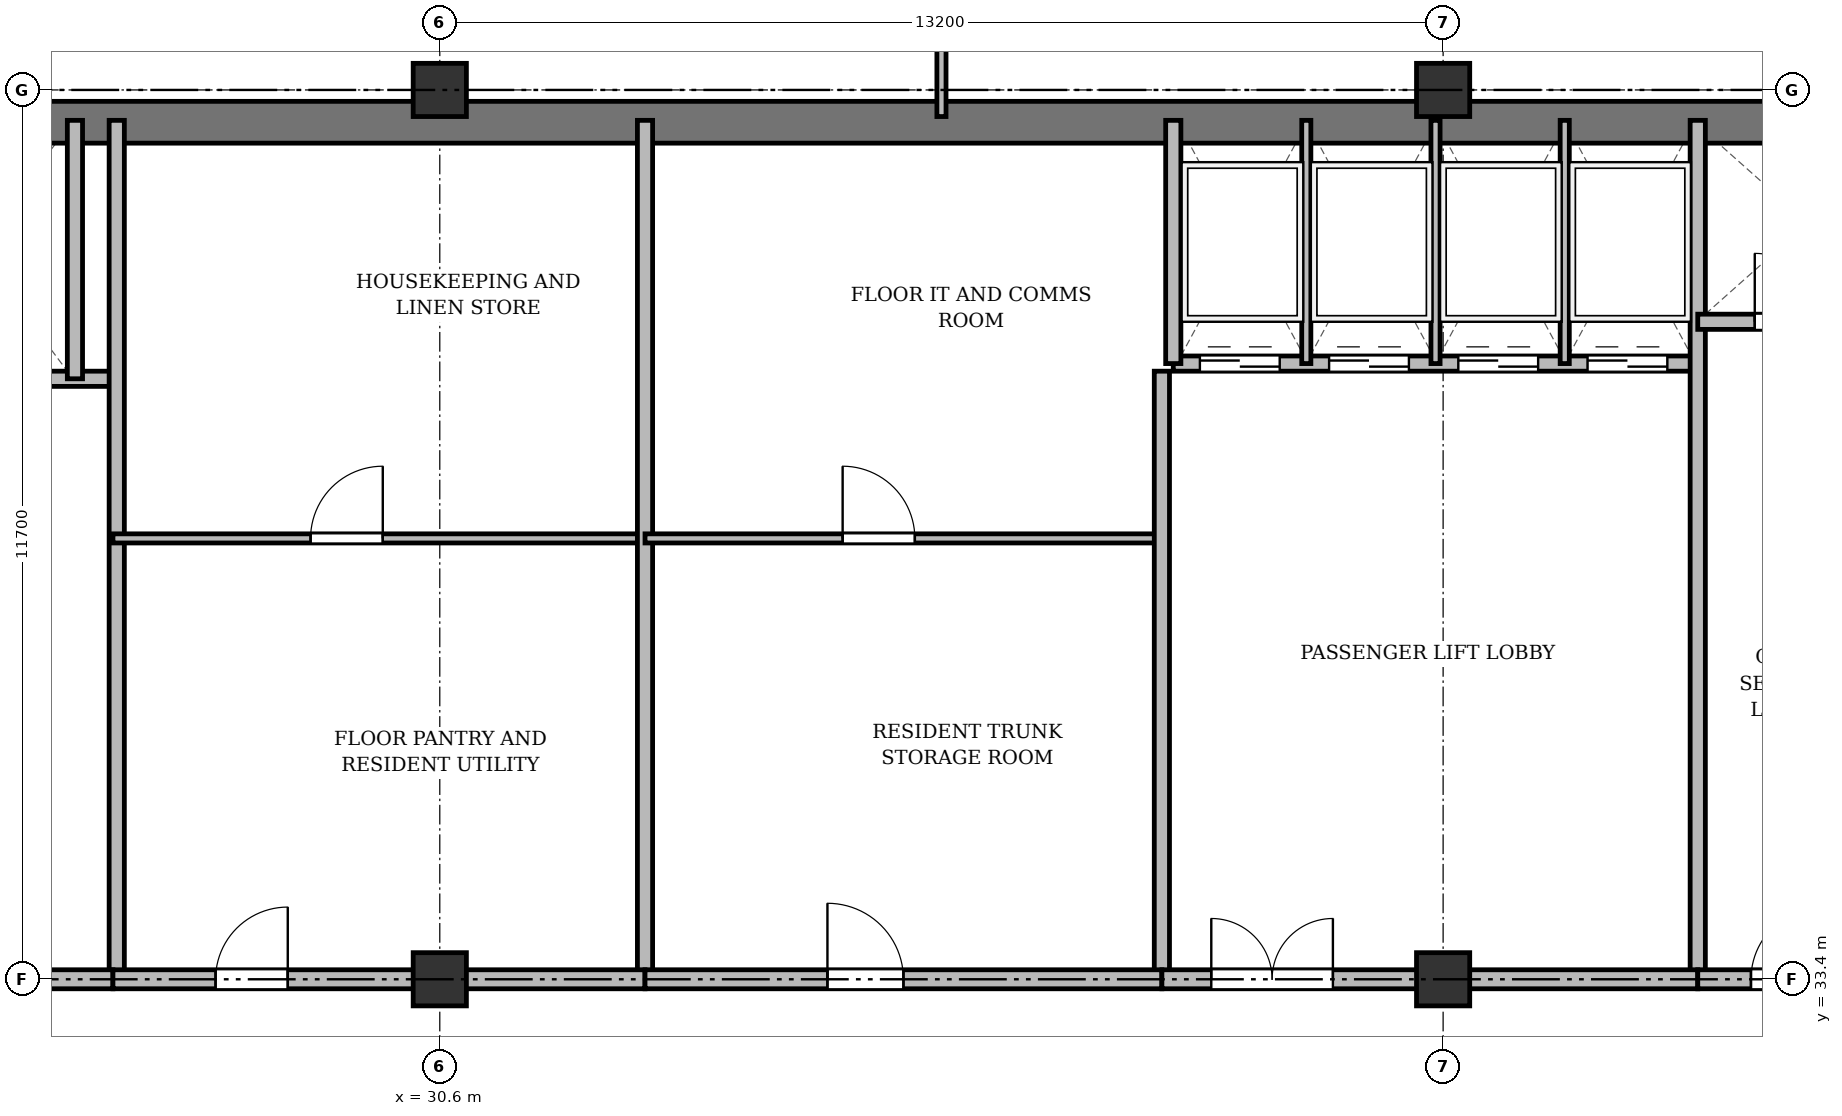
"""IFC4 building model, lengths in metres.
Left out: names, types, materials, properties, quantities, classifications, styles, units other than length and angle.
Written with IfcOpenShell. Run it as: python <this file> out.ifc"""

import sys

from ifc_helpers import new_model, si_unit, direction, frame, frame_2d, origin, origin_2d, place, context, subcontext, project, spatial, rectangle, extrude, source, transform, mapped, element, fill, save


model = new_model("IFC4")
c1 = context("Model", 3, precision=1e-05, world=origin(), true_north=direction((0.0, 1.0)))
c2 = subcontext(c1, "Body", "Model", "MODEL_VIEW")
j1 = project(units=[si_unit("LENGTHUNIT", "METRE"), si_unit("PLANEANGLEUNIT", "RADIAN")], contexts=[c1])
p1 = place(None, origin())
s1 = spatial("IfcSite", under=j1, at=p1, CompositionType="ELEMENT")
p2 = place(p1, origin())
s2 = spatial("IfcBuilding", under=s1, at=p2, CompositionType="ELEMENT")
p3 = place(p2, frame((0.0, 0.0, 226.5)))
s3 = spatial("IfcBuildingStorey", under=s2, at=p3, CompositionType="ELEMENT", Elevation=226.5)
m1 = source(origin(), c2, "Body", "SweptSolid", [
    extrude(rectangle(XDim=0.7, YDim=0.7, at=origin_2d()), origin(), (0.0, 0.0, 1.0), 3.6),
])
for number, where, z_axis, x_axis in (
    (1, (30.6, 33.4, 0.0), (0.0, 0.0, 1.0), (1.0, 0.0, 0.0)),
    (2, (30.6, 45.1, 0.0), (0.0, 0.0, 1.0), (1.0, 0.0, 0.0)),
    (3, (43.8, 33.4, 0.0), (0.0, 0.0, 1.0), (1.0, 0.0, 0.0)),
    (4, (43.8, 45.1, 0.0), (0.0, 0.0, 1.0), (1.0, 0.0, 0.0)),
):
    element("IfcColumn", number, at=place(p3, frame(where, z_axis=z_axis, x_axis=x_axis)), inside=s3, PredefinedType="COLUMN", context=c2, shape_type="MappedRepresentation", body=[
        mapped(m1, transform((0.0, 0.0, 0.0), x_axis=(1.0, 0.0, 0.0), y_axis=(0.0, 1.0, 0.0), z_axis=(0.0, 0.0, 1.0), scale=1.0)),
    ])
p4 = place(p3, frame((15.65, 44.675, 0.0), z_axis=(0.0, 0.0, 1.0), x_axis=(1.0, 0.0, 0.0)))
e5 = element("IfcWall", 5, at=p4, inside=s3, PredefinedType="SHEAR", context=c2, shape_type="SweptSolid", body=[
    extrude(rectangle(XDim=43.1, YDim=0.55, at=frame_2d((21.55, 0.0))), origin(), (0.0, 0.0, 1.0), 3.36),
])
p5 = place(p3, frame((19.55, 41.3, 0.0), z_axis=(0.0, 0.0, 1.0), x_axis=(1.0, 0.0, 0.0)))
e6 = element("IfcWall", 6, at=p5, inside=s3, PredefinedType="SOLIDWALL", context=c2, shape_type="SweptSolid", body=[
    extrude(rectangle(XDim=6.75, YDim=0.2, at=frame_2d((3.375, 0.0))), origin(), (0.0, 0.0, 1.0), 3.36),
])
p6 = place(p5, frame((1.7, 0.0, 0.0)))
e7 = element("IfcOpeningElement", 7, at=p6, cuts=e6, PredefinedType="OPENING", context=c2, shape_type="SweptSolid", body=[
    extrude(rectangle(XDim=1.1, YDim=2.15, at=frame_2d((0.55, 1.075))), frame((0.0, 0.11, 0.0), z_axis=(0.0, -1.0, 0.0), x_axis=(1.0, 0.0, 0.0)), (0.0, 0.0, 1.0), 0.22),
])
p7 = place(p5, frame((4.4, 0.0, 0.0)))
e8 = element("IfcOpeningElement", 8, at=p7, cuts=e6, PredefinedType="OPENING", context=c2, shape_type="SweptSolid", body=[
    extrude(rectangle(XDim=1.1, YDim=2.15, at=frame_2d((0.55, 1.075))), frame((0.0, 0.11, 0.0), z_axis=(0.0, -1.0, 0.0), x_axis=(1.0, 0.0, 0.0)), (0.0, 0.0, 1.0), 0.22),
])
p8 = place(p3, frame((25.8, 41.3, 0.0), z_axis=(0.0, 0.0, 1.0), x_axis=(0.0, 1.0, 0.0)))
e9 = element("IfcWall", 9, at=p8, inside=s3, PredefinedType="SOLIDWALL", context=c2, shape_type="SweptSolid", body=[
    extrude(rectangle(XDim=3.4, YDim=0.2, at=frame_2d((1.7, 0.0))), origin(), (0.0, 0.0, 1.0), 3.36),
])
p9 = place(p3, frame((26.35, 33.4, 0.0), z_axis=(0.0, 0.0, 1.0), x_axis=(0.0, 1.0, 0.0)))
e10 = element("IfcWall", 10, at=p9, inside=s3, PredefinedType="SOLIDWALL", context=c2, shape_type="SweptSolid", body=[
    extrude(rectangle(XDim=11.3, YDim=0.2, at=frame_2d((5.65, 0.0))), origin(), (0.0, 0.0, 1.0), 2.91),
])
p10 = place(p3, frame((19.5, 33.4, 0.0), z_axis=(0.0, 0.0, 1.0), x_axis=(1.0, 0.0, 0.0)))
e11 = element("IfcWall", 11, at=p10, inside=s3, PredefinedType="PARTITIONING", context=c2, shape_type="SweptSolid", body=[
    extrude(rectangle(XDim=6.8, YDim=0.25, at=frame_2d((3.4, 0.0))), origin(), (0.0, 0.0, 1.0), 2.91),
])
p11 = place(p10, frame((0.75, 0.0, 0.0)))
e12 = element("IfcOpeningElement", 12, at=p11, cuts=e11, PredefinedType="OPENING", context=c2, shape_type="SweptSolid", body=[
    extrude(rectangle(XDim=1.6, YDim=2.2, at=frame_2d((0.8, 1.1))), frame((0.0, 0.135, 0.0), z_axis=(0.0, -1.0, 0.0), x_axis=(1.0, 0.0, 0.0)), (0.0, 0.0, 1.0), 0.27),
])
p12 = place(p3, frame((26.3, 39.2, 0.0), z_axis=(0.0, 0.0, 1.0), x_axis=(1.0, 0.0, 0.0)))
e13 = element("IfcWall", 13, at=p12, inside=s3, PredefinedType="PARTITIONING", context=c2, shape_type="SweptSolid", body=[
    extrude(rectangle(XDim=7.0, YDim=0.12, at=frame_2d((3.5, 0.0))), origin(), (0.0, 0.0, 1.0), 2.86),
])
p13 = place(p12, frame((2.6, 0.0, 0.0)))
e14 = element("IfcOpeningElement", 14, at=p13, cuts=e13, PredefinedType="OPENING", context=c2, shape_type="SweptSolid", body=[
    extrude(rectangle(XDim=0.95, YDim=2.15, at=frame_2d((0.475, 1.075))), frame((0.0, 0.07, 0.0), z_axis=(0.0, -1.0, 0.0), x_axis=(1.0, 0.0, 0.0)), (0.0, 0.0, 1.0), 0.14),
])
p14 = place(p3, frame((33.3, 33.4, 0.0), z_axis=(0.0, 0.0, 1.0), x_axis=(0.0, 1.0, 0.0)))
e15 = element("IfcWall", 15, at=p14, inside=s3, PredefinedType="SOLIDWALL", context=c2, shape_type="SweptSolid", body=[
    extrude(rectangle(XDim=11.3, YDim=0.2, at=frame_2d((5.65, 0.0))), origin(), (0.0, 0.0, 1.0), 2.91),
])
p15 = place(p3, frame((33.3, 39.2, 0.0), z_axis=(0.0, 0.0, 1.0), x_axis=(1.0, 0.0, 0.0)))
e16 = element("IfcWall", 16, at=p15, inside=s3, PredefinedType="PARTITIONING", context=c2, shape_type="SweptSolid", body=[
    extrude(rectangle(XDim=6.8, YDim=0.12, at=frame_2d((3.4, 0.0))), origin(), (0.0, 0.0, 1.0), 3.36),
])
p16 = place(p15, frame((2.6, 0.0, 0.0)))
e17 = element("IfcOpeningElement", 17, at=p16, cuts=e16, PredefinedType="OPENING", context=c2, shape_type="SweptSolid", body=[
    extrude(rectangle(XDim=0.95, YDim=2.15, at=frame_2d((0.475, 1.075))), frame((0.0, 0.07, 0.0), z_axis=(0.0, -1.0, 0.0), x_axis=(1.0, 0.0, 0.0)), (0.0, 0.0, 1.0), 0.14),
])
p17 = place(p3, frame((40.1, 33.4, 0.0), z_axis=(0.0, 0.0, 1.0), x_axis=(0.0, 1.0, 0.0)))
e18 = element("IfcWall", 18, at=p17, inside=s3, PredefinedType="SOLIDWALL", context=c2, shape_type="SweptSolid", body=[
    extrude(rectangle(XDim=8.0, YDim=0.2, at=frame_2d((4.0, 0.0))), origin(), (0.0, 0.0, 1.0), 2.91),
])
p18 = place(p3, frame((40.25, 41.5, 0.0), z_axis=(0.0, 0.0, 1.0), x_axis=(1.0, 0.0, 0.0)))
e19 = element("IfcWall", 19, at=p18, inside=s3, PredefinedType="SOLIDWALL", context=c2, shape_type="SweptSolid", body=[
    extrude(rectangle(XDim=6.9, YDim=0.2, at=frame_2d((3.45, 0.0))), origin(), (0.0, 0.0, 1.0), 3.36),
])
p19 = place(p18, frame((0.35, 0.0, 0.0)))
e20 = element("IfcOpeningElement", 20, at=p19, cuts=e19, PredefinedType="OPENING", context=c2, shape_type="SweptSolid", body=[
    extrude(rectangle(XDim=1.05, YDim=2.15, at=frame_2d((0.525, 1.075))), frame((0.0, 0.11, 0.0), z_axis=(0.0, -1.0, 0.0), x_axis=(1.0, 0.0, 0.0)), (0.0, 0.0, 1.0), 0.22),
])
p20 = place(p18, frame((2.05, 0.0, 0.0)))
e21 = element("IfcOpeningElement", 21, at=p20, cuts=e19, PredefinedType="OPENING", context=c2, shape_type="SweptSolid", body=[
    extrude(rectangle(XDim=1.05, YDim=2.15, at=frame_2d((0.525, 1.075))), frame((0.0, 0.11, 0.0), z_axis=(0.0, -1.0, 0.0), x_axis=(1.0, 0.0, 0.0)), (0.0, 0.0, 1.0), 0.22),
])
p21 = place(p18, frame((3.75, 0.0, 0.0)))
e22 = element("IfcOpeningElement", 22, at=p21, cuts=e19, PredefinedType="OPENING", context=c2, shape_type="SweptSolid", body=[
    extrude(rectangle(XDim=1.05, YDim=2.15, at=frame_2d((0.525, 1.075))), frame((0.0, 0.11, 0.0), z_axis=(0.0, -1.0, 0.0), x_axis=(1.0, 0.0, 0.0)), (0.0, 0.0, 1.0), 0.22),
])
p22 = place(p18, frame((5.45, 0.0, 0.0)))
e23 = element("IfcOpeningElement", 23, at=p22, cuts=e19, PredefinedType="OPENING", context=c2, shape_type="SweptSolid", body=[
    extrude(rectangle(XDim=1.05, YDim=2.15, at=frame_2d((0.525, 1.075))), frame((0.0, 0.11, 0.0), z_axis=(0.0, -1.0, 0.0), x_axis=(1.0, 0.0, 0.0)), (0.0, 0.0, 1.0), 0.22),
])
p23 = place(p3, frame((40.25, 41.5, 0.0), z_axis=(0.0, 0.0, 1.0), x_axis=(0.0, 1.0, 0.0)))
e24 = element("IfcWall", 24, at=p23, inside=s3, PredefinedType="SOLIDWALL", context=c2, shape_type="SweptSolid", body=[
    extrude(rectangle(XDim=3.2, YDim=0.2, at=frame_2d((1.6, 0.0))), origin(), (0.0, 0.0, 1.0), 3.36),
])
for number, where, z_axis, x_axis in (
    (25, (42.0, 41.5, 0.0), (0.0, 0.0, 1.0), (0.0, 1.0, 0.0)),
    (26, (43.7, 41.5, 0.0), (0.0, 0.0, 1.0), (0.0, 1.0, 0.0)),
    (27, (45.4, 41.5, 0.0), (0.0, 0.0, 1.0), (0.0, 1.0, 0.0)),
):
    element("IfcWall", number, at=place(p3, frame(where, z_axis=z_axis, x_axis=x_axis)), inside=s3, PredefinedType="PARTITIONING", context=c2, shape_type="SweptSolid", body=[
        extrude(rectangle(XDim=3.2, YDim=0.12, at=frame_2d((1.6, 0.0))), origin(), (0.0, 0.0, 1.0), 3.36),
    ])
p24 = place(p3, frame((47.15, 33.4, 0.0), z_axis=(0.0, 0.0, 1.0), x_axis=(0.0, 1.0, 0.0)))
e28 = element("IfcWall", 28, at=p24, inside=s3, PredefinedType="SOLIDWALL", context=c2, shape_type="SweptSolid", body=[
    extrude(rectangle(XDim=11.3, YDim=0.2, at=frame_2d((5.65, 0.0))), origin(), (0.0, 0.0, 1.0), 2.91),
])
p25 = place(p3, frame((26.3, 33.4, 0.0), z_axis=(0.0, 0.0, 1.0), x_axis=(1.0, 0.0, 0.0)))
e29 = element("IfcWall", 29, at=p25, inside=s3, PredefinedType="PARTITIONING", context=c2, shape_type="SweptSolid", body=[
    extrude(rectangle(XDim=7.0, YDim=0.25, at=frame_2d((3.5, 0.0))), origin(), (0.0, 0.0, 1.0), 2.91),
])
p26 = place(p25, frame((1.35, 0.0, 0.0)))
e30 = element("IfcOpeningElement", 30, at=p26, cuts=e29, PredefinedType="OPENING", context=c2, shape_type="SweptSolid", body=[
    extrude(rectangle(XDim=0.95, YDim=2.15, at=frame_2d((0.475, 1.075))), frame((0.0, 0.135, 0.0), z_axis=(0.0, -1.0, 0.0), x_axis=(1.0, 0.0, 0.0)), (0.0, 0.0, 1.0), 0.27),
])
p27 = place(p3, frame((33.3, 33.4, 0.0), z_axis=(0.0, 0.0, 1.0), x_axis=(1.0, 0.0, 0.0)))
e31 = element("IfcWall", 31, at=p27, inside=s3, PredefinedType="PARTITIONING", context=c2, shape_type="SweptSolid", body=[
    extrude(rectangle(XDim=6.8, YDim=0.25, at=frame_2d((3.4, 0.0))), origin(), (0.0, 0.0, 1.0), 2.91),
])
p28 = place(p27, frame((2.4, 0.0, 0.0)))
e32 = element("IfcOpeningElement", 32, at=p28, cuts=e31, PredefinedType="OPENING", context=c2, shape_type="SweptSolid", body=[
    extrude(rectangle(XDim=1.0, YDim=2.15, at=frame_2d((0.5, 1.075))), frame((0.0, 0.135, 0.0), z_axis=(0.0, -1.0, 0.0), x_axis=(1.0, 0.0, 0.0)), (0.0, 0.0, 1.0), 0.27),
])
p29 = place(p3, frame((40.1, 33.4, 0.0), z_axis=(0.0, 0.0, 1.0), x_axis=(1.0, 0.0, 0.0)))
e33 = element("IfcWall", 33, at=p29, inside=s3, PredefinedType="PARTITIONING", context=c2, shape_type="SweptSolid", body=[
    extrude(rectangle(XDim=7.05, YDim=0.25, at=frame_2d((3.525, 0.0))), origin(), (0.0, 0.0, 1.0), 2.91),
])
p30 = place(p29, frame((0.65, 0.0, 0.0)))
e34 = element("IfcOpeningElement", 34, at=p30, cuts=e33, PredefinedType="OPENING", context=c2, shape_type="SweptSolid", body=[
    extrude(rectangle(XDim=1.6, YDim=2.2, at=frame_2d((0.8, 1.1))), frame((0.0, 0.135, 0.0), z_axis=(0.0, -1.0, 0.0), x_axis=(1.0, 0.0, 0.0)), (0.0, 0.0, 1.0), 0.27),
])
p31 = place(p3, frame((47.15, 42.05, 0.0), z_axis=(0.0, 0.0, 1.0), x_axis=(1.0, 0.0, 0.0)))
e35 = element("IfcWall", 35, at=p31, inside=s3, PredefinedType="SOLIDWALL", context=c2, shape_type="SweptSolid", body=[
    extrude(rectangle(XDim=7.85, YDim=0.2, at=frame_2d((3.925, 0.0))), origin(), (0.0, 0.0, 1.0), 2.86),
])
p32 = place(p31, frame((0.75, 0.0, 0.0)))
e36 = element("IfcOpeningElement", 36, at=p32, cuts=e35, PredefinedType="OPENING", context=c2, shape_type="SweptSolid", body=[
    extrude(rectangle(XDim=0.9, YDim=2.1, at=frame_2d((0.45, 1.05))), frame((0.0, 0.11, 0.0), z_axis=(0.0, -1.0, 0.0), x_axis=(1.0, 0.0, 0.0)), (0.0, 0.0, 1.0), 0.22),
])
p33 = place(p31, frame((3.85, 0.0, 0.0)))
e37 = element("IfcOpeningElement", 37, at=p33, cuts=e35, PredefinedType="OPENING", context=c2, shape_type="SweptSolid", body=[
    extrude(rectangle(XDim=0.9, YDim=2.1, at=frame_2d((0.45, 1.05))), frame((0.0, 0.11, 0.0), z_axis=(0.0, -1.0, 0.0), x_axis=(1.0, 0.0, 0.0)), (0.0, 0.0, 1.0), 0.22),
])
p34 = place(p3, frame((47.15, 33.4, 0.0), z_axis=(0.0, 0.0, 1.0), x_axis=(1.0, 0.0, 0.0)))
e38 = element("IfcWall", 38, at=p34, inside=s3, PredefinedType="PARTITIONING", context=c2, shape_type="SweptSolid", body=[
    extrude(rectangle(XDim=11.15, YDim=0.25, at=frame_2d((5.575, 0.0))), origin(), (0.0, 0.0, 1.0), 2.91),
])
p35 = place(p34, frame((0.7, 0.0, 0.0)))
e39 = element("IfcOpeningElement", 39, at=p35, cuts=e38, PredefinedType="OPENING", context=c2, shape_type="SweptSolid", body=[
    extrude(rectangle(XDim=0.95, YDim=2.15, at=frame_2d((0.475, 1.075))), frame((0.0, 0.135, 0.0), z_axis=(0.0, -1.0, 0.0), x_axis=(1.0, 0.0, 0.0)), (0.0, 0.0, 1.0), 0.27),
])
p36 = place(p34, frame((6.0, 0.0, 0.0)))
e40 = element("IfcOpeningElement", 40, at=p36, cuts=e38, PredefinedType="OPENING", context=c2, shape_type="SweptSolid", body=[
    extrude(rectangle(XDim=1.2, YDim=2.15, at=frame_2d((0.6, 1.075))), frame((0.0, 0.135, 0.0), z_axis=(0.0, -1.0, 0.0), x_axis=(1.0, 0.0, 0.0)), (0.0, 0.0, 1.0), 0.27),
])
p37 = place(p3, frame((37.2, 44.75, 0.0), z_axis=(0.0, 0.0, 1.0), x_axis=(0.0, 1.0, 0.0)))
e41 = element("IfcWall", 41, at=p37, inside=s3, PredefinedType="PARTITIONING", context=c2, shape_type="SweptSolid", body=[
    extrude(rectangle(XDim=3.61, YDim=0.12, at=frame_2d((1.805, 0.0))), origin(), (0.0, 0.0, 1.0), 2.91),
])
p38 = place(p37, frame((1.1, 0.0, 0.0)))
e42 = element("IfcOpeningElement", 42, at=p38, cuts=e41, PredefinedType="OPENING", context=c2, shape_type="SweptSolid", body=[
    extrude(rectangle(XDim=0.95, YDim=2.15, at=frame_2d((0.475, 1.075))), frame((0.0, 0.07, 0.0), z_axis=(0.0, -1.0, 0.0), x_axis=(1.0, 0.0, 0.0)), (0.0, 0.0, 1.0), 0.14),
])
m2 = source(origin(), c2, "Body", "SweptSolid", [
    extrude(rectangle(XDim=0.95, YDim=2.15, at=frame_2d((0.475, 1.075))), frame((0.0, 0.025, 0.0), z_axis=(0.0, -1.0, 0.0), x_axis=(1.0, 0.0, 0.0)), (0.0, 0.0, 1.0), 0.05),
])
p39 = place(p13, origin())
e43 = element("IfcDoor", 43, at=p39, inside=s3, OperationType="SINGLE_SWING_RIGHT", PredefinedType="DOOR", context=c2, shape_type="MappedRepresentation", body=[
    mapped(m2, transform((0.0, 0.0, 0.0), x_axis=(1.0, 0.0, 0.0), y_axis=(0.0, 1.0, 0.0), z_axis=(0.0, 0.0, 1.0), scale=1.0)),
])
fill(e14, e43)
p40 = place(p16, origin())
e44 = element("IfcDoor", 44, at=p40, inside=s3, OperationType="SINGLE_SWING_LEFT", PredefinedType="DOOR", context=c2, shape_type="MappedRepresentation", body=[
    mapped(m2, transform((0.0, 0.0, 0.0), x_axis=(1.0, 0.0, 0.0), y_axis=(0.0, 1.0, 0.0), z_axis=(0.0, 0.0, 1.0), scale=1.0)),
])
fill(e17, e44)
m3 = source(origin(), c2, "Body", "SweptSolid", [
    extrude(rectangle(XDim=1.05, YDim=2.15, at=frame_2d((0.525, 1.075))), frame((0.0, 0.025, 0.0), z_axis=(0.0, -1.0, 0.0), x_axis=(1.0, 0.0, 0.0)), (0.0, 0.0, 1.0), 0.05),
])
p41 = place(p19, origin())
e45 = element("IfcDoor", 45, at=p41, inside=s3, OperationType="DOUBLE_DOOR_SLIDING", PredefinedType="DOOR", context=c2, shape_type="MappedRepresentation", body=[
    mapped(m3, transform((0.0, 0.0, 0.0), x_axis=(1.0, 0.0, 0.0), y_axis=(0.0, 1.0, 0.0), z_axis=(0.0, 0.0, 1.0), scale=1.0)),
])
fill(e20, e45)
p42 = place(p20, origin())
e46 = element("IfcDoor", 46, at=p42, inside=s3, OperationType="DOUBLE_DOOR_SLIDING", PredefinedType="DOOR", context=c2, shape_type="MappedRepresentation", body=[
    mapped(m3, transform((0.0, 0.0, 0.0), x_axis=(1.0, 0.0, 0.0), y_axis=(0.0, 1.0, 0.0), z_axis=(0.0, 0.0, 1.0), scale=1.0)),
])
fill(e21, e46)
p43 = place(p21, origin())
e47 = element("IfcDoor", 47, at=p43, inside=s3, OperationType="DOUBLE_DOOR_SLIDING", PredefinedType="DOOR", context=c2, shape_type="MappedRepresentation", body=[
    mapped(m3, transform((0.0, 0.0, 0.0), x_axis=(1.0, 0.0, 0.0), y_axis=(0.0, 1.0, 0.0), z_axis=(0.0, 0.0, 1.0), scale=1.0)),
])
fill(e22, e47)
p44 = place(p22, origin())
e48 = element("IfcDoor", 48, at=p44, inside=s3, OperationType="DOUBLE_DOOR_SLIDING", PredefinedType="DOOR", context=c2, shape_type="MappedRepresentation", body=[
    mapped(m3, transform((0.0, 0.0, 0.0), x_axis=(1.0, 0.0, 0.0), y_axis=(0.0, 1.0, 0.0), z_axis=(0.0, 0.0, 1.0), scale=1.0)),
])
fill(e23, e48)
p45 = place(p26, origin())
e49 = element("IfcDoor", 49, at=p45, inside=s3, OperationType="SINGLE_SWING_RIGHT", PredefinedType="DOOR", context=c2, shape_type="MappedRepresentation", body=[
    mapped(m2, transform((0.0, 0.0, 0.0), x_axis=(1.0, 0.0, 0.0), y_axis=(0.0, 1.0, 0.0), z_axis=(0.0, 0.0, 1.0), scale=1.0)),
])
fill(e30, e49)
m4 = source(origin(), c2, "Body", "SweptSolid", [
    extrude(rectangle(XDim=1.0, YDim=2.15, at=frame_2d((0.5, 1.075))), frame((0.0, 0.025, 0.0), z_axis=(0.0, -1.0, 0.0), x_axis=(1.0, 0.0, 0.0)), (0.0, 0.0, 1.0), 0.05),
])
p46 = place(p28, origin())
e50 = element("IfcDoor", 50, at=p46, inside=s3, OperationType="SINGLE_SWING_LEFT", PredefinedType="DOOR", context=c2, shape_type="MappedRepresentation", body=[
    mapped(m4, transform((0.0, 0.0, 0.0), x_axis=(1.0, 0.0, 0.0), y_axis=(0.0, 1.0, 0.0), z_axis=(0.0, 0.0, 1.0), scale=1.0)),
])
fill(e32, e50)
m5 = source(origin(), c2, "Body", "SweptSolid", [
    extrude(rectangle(XDim=1.6, YDim=2.2, at=frame_2d((0.8, 1.1))), frame((0.0, 0.025, 0.0), z_axis=(0.0, -1.0, 0.0), x_axis=(1.0, 0.0, 0.0)), (0.0, 0.0, 1.0), 0.05),
])
p47 = place(p30, origin())
e51 = element("IfcDoor", 51, at=p47, inside=s3, OperationType="DOUBLE_DOOR_SINGLE_SWING", PredefinedType="DOOR", context=c2, shape_type="MappedRepresentation", body=[
    mapped(m5, transform((0.0, 0.0, 0.0), x_axis=(1.0, 0.0, 0.0), y_axis=(0.0, 1.0, 0.0), z_axis=(0.0, 0.0, 1.0), scale=1.0)),
])
fill(e34, e51)
m6 = source(origin(), c2, "Body", "SweptSolid", [
    extrude(rectangle(XDim=0.9, YDim=2.1, at=frame_2d((0.45, 1.05))), frame((0.0, 0.025, 0.0), z_axis=(0.0, -1.0, 0.0), x_axis=(1.0, 0.0, 0.0)), (0.0, 0.0, 1.0), 0.05),
])
p48 = place(p32, origin())
e52 = element("IfcDoor", 52, at=p48, inside=s3, OperationType="SINGLE_SWING_LEFT", PredefinedType="DOOR", context=c2, shape_type="MappedRepresentation", body=[
    mapped(m6, transform((0.0, 0.0, 0.0), x_axis=(1.0, 0.0, 0.0), y_axis=(0.0, 1.0, 0.0), z_axis=(0.0, 0.0, 1.0), scale=1.0)),
])
fill(e36, e52)
p49 = place(p35, origin())
e53 = element("IfcDoor", 53, at=p49, inside=s3, OperationType="SINGLE_SWING_RIGHT", PredefinedType="DOOR", context=c2, shape_type="MappedRepresentation", body=[
    mapped(m2, transform((0.0, 0.0, 0.0), x_axis=(1.0, 0.0, 0.0), y_axis=(0.0, 1.0, 0.0), z_axis=(0.0, 0.0, 1.0), scale=1.0)),
])
fill(e39, e53)
save(model, sys.argv[1])
